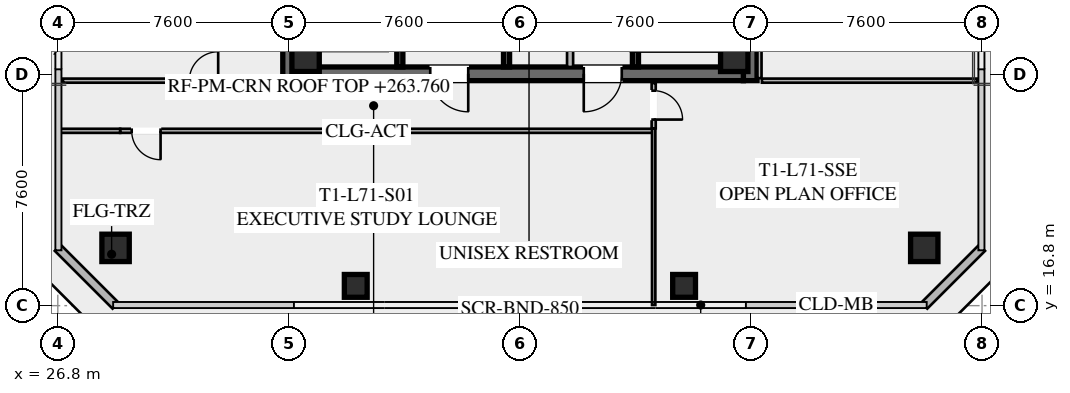
"""IFC4 building model, lengths in metres.
Left out: names, types, materials, properties, quantities, classifications, styles, units other than length and angle.
Written with IfcOpenShell. Run it as: python <this file> out.ifc"""

import sys

from ifc_helpers import new_model, si_unit, direction, frame, frame_2d, origin, origin_2d, place, context, subcontext, project, spatial, rectangle, hollow_rectangle, extrude, element, fill, save


model = new_model("IFC4")
c1 = context("Model", 3, precision=1e-05, world=origin(), true_north=direction((0.0, 1.0)))
c2 = subcontext(c1, "Body", "Model", "MODEL_VIEW")
j1 = project(units=[si_unit("LENGTHUNIT", "METRE"), si_unit("PLANEANGLEUNIT", "RADIAN")], contexts=[c1])
p1 = place(None, origin())
s1 = spatial("IfcSite", under=j1, at=p1, CompositionType="ELEMENT")
p2 = place(p1, origin())
s2 = spatial("IfcBuilding", under=s1, at=p2, CompositionType="ELEMENT")
p3 = place(p2, frame((0.0, 0.0, 263.4)))
s3 = spatial("IfcBuildingStorey", under=s2, at=p3, CompositionType="ELEMENT", Elevation=263.4)
for number, where, z_axis, x_axis in (
    (1, (34.425, 24.2, 0.0), (0.0, 0.0, 1.0), (0.0, 1.0, 0.0)),
    (2, (49.575, 39.8, 0.0), (0.0, 0.0, 1.0), (0.0, -1.0, 0.0)),
):
    element("IfcWall", number, at=place(p3, frame(where, z_axis=z_axis, x_axis=x_axis)), inside=s3, PredefinedType="SHEAR", context=c2, shape_type="SweptSolid", body=[
        extrude(rectangle(XDim=15.6, YDim=0.45, at=frame_2d((7.8, 0.0))), origin(), (0.0, 0.0, 1.0), 3.55),
    ])
p4 = place(p3, frame((49.35, 24.425, 0.0), z_axis=(0.0, 0.0, 1.0), x_axis=(-1.0, 0.0, 0.0)))
e3 = element("IfcWall", 3, at=p4, inside=s3, PredefinedType="SHEAR", context=c2, shape_type="SweptSolid", body=[
    extrude(rectangle(XDim=14.7, YDim=0.45, at=frame_2d((7.35, 0.0))), origin(), (0.0, 0.0, 1.0), 3.55),
])
p5 = place(p4, frame((9.05, 0.0, 0.0)))
e4 = element("IfcOpeningElement", 4, at=p5, cuts=e3, PredefinedType="OPENING", context=c2, shape_type="SweptSolid", body=[
    extrude(rectangle(XDim=1.25, YDim=2.25, at=frame_2d((0.625, 1.125))), frame((0.0, 0.235, 0.0), z_axis=(0.0, -1.0, 0.0), x_axis=(1.0, 0.0, 0.0)), (0.0, 0.0, 1.0), 0.47),
])
p6 = place(p4, frame((4.0, 0.0, 0.0)))
e5 = element("IfcOpeningElement", 5, at=p6, cuts=e3, PredefinedType="OPENING", context=c2, shape_type="SweptSolid", body=[
    extrude(rectangle(XDim=1.25, YDim=2.25, at=frame_2d((0.625, 1.125))), frame((0.0, 0.235, 0.0), z_axis=(0.0, -1.0, 0.0), x_axis=(1.0, 0.0, 0.0)), (0.0, 0.0, 1.0), 0.47),
])
for number, where, z_axis, x_axis in (
    (6, (34.95, 24.95, 0.0), (0.0, 0.0, 1.0), (1.0, 0.0, 0.0)),
    (7, (49.05, 24.95, 0.0), (0.0, 0.0, 1.0), (1.0, 0.0, 0.0)),
):
    element("IfcColumn", number, at=place(p3, frame(where, z_axis=z_axis, x_axis=x_axis)), inside=s3, PredefinedType="COLUMN", context=c2, shape_type="SweptSolid", body=[
        extrude(hollow_rectangle(XDim=0.9, YDim=0.9, WallThickness=0.04, at=origin_2d()), origin(), (0.0, 0.0, 1.0), 3.37),
    ])
for number, where, z_axis, x_axis in (
    (8, (28.7, 18.7, -0.295), (0.0, 0.0, 1.0), (1.0, 0.0, 0.0)),
    (9, (55.3, 18.7, -0.295), (0.0, 0.0, 1.0), (1.0, 0.0, 0.0)),
):
    element("IfcColumn", number, at=place(p3, frame(where, z_axis=z_axis, x_axis=x_axis)), inside=s3, PredefinedType="COLUMN", context=c2, shape_type="SweptSolid", body=[
        extrude(hollow_rectangle(XDim=0.9, YDim=0.9, WallThickness=0.04, at=origin_2d()), origin(), (0.0, 0.0, 1.0), 3.665),
    ])
for number, where, z_axis, x_axis in (
    (10, (36.6, 17.45, -0.295), (0.0, 0.0, 1.0), (1.0, 0.0, 0.0)),
    (11, (47.4, 17.45, -0.295), (0.0, 0.0, 1.0), (1.0, 0.0, 0.0)),
):
    element("IfcColumn", number, at=place(p3, frame(where, z_axis=z_axis, x_axis=x_axis)), inside=s3, PredefinedType="COLUMN", context=c2, shape_type="SweptSolid", body=[
        extrude(hollow_rectangle(XDim=0.75, YDim=0.75, WallThickness=0.032, at=origin_2d()), origin(), (0.0, 0.0, 1.0), 3.665),
    ])
for number, where, z_axis, x_axis in (
    (12, (28.7, 16.8, 0.0), (0.0, 0.0, 1.0), (-0.707, 0.707, 0.0)),
    (13, (57.2, 18.7, 0.0), (0.0, 0.0, 1.0), (-0.707, -0.707, 0.0)),
):
    element("IfcWall", number, at=place(p3, frame(where, z_axis=z_axis, x_axis=x_axis)), inside=s3, PredefinedType="SOLIDWALL", context=c2, shape_type="SweptSolid", body=[
        extrude(rectangle(XDim=2.687, YDim=0.28, at=frame_2d((1.343, 0.0))), origin(), (0.0, 0.0, 1.0), 3.37),
    ])
p7 = place(p3, frame((45.8, 32.8, 0.0), z_axis=(0.0, 0.0, 1.0), x_axis=(0.0, -1.0, 0.0)))
e14 = element("IfcWall", 14, at=p7, inside=s3, PredefinedType="SHEAR", context=c2, shape_type="SweptSolid", body=[
    extrude(rectangle(XDim=8.15, YDim=0.2, at=frame_2d((4.075, 0.0))), origin(), (0.0, 0.0, 1.0), 3.37),
])
p8 = place(p7, frame((0.45, 0.0, 0.0)))
e15 = element("IfcOpeningElement", 15, at=p8, cuts=e14, PredefinedType="OPENING", context=c2, shape_type="SweptSolid", body=[
    extrude(rectangle(XDim=1.15, YDim=2.2, at=frame_2d((0.575, 1.1))), frame((0.0, 0.11, 0.0), z_axis=(0.0, -1.0, 0.0), x_axis=(1.0, 0.0, 0.0)), (0.0, 0.0, 1.0), 0.22),
])
p9 = place(p3, frame((41.56, 24.65, 0.0), z_axis=(0.0, 0.0, 1.0), x_axis=(0.0, 1.0, 0.0)))
e16 = element("IfcWall", 16, at=p9, inside=s3, PredefinedType="SHEAR", context=c2, shape_type="SweptSolid", body=[
    extrude(rectangle(XDim=14.7, YDim=0.2, at=frame_2d((7.35, 0.0))), origin(), (0.0, 0.0, 1.0), 3.37),
])
p10 = place(p3, frame((38.05, 24.65, 0.0), z_axis=(0.0, 0.0, 1.0), x_axis=(0.0, 1.0, 0.0)))
e17 = element("IfcWall", 17, at=p10, inside=s3, PredefinedType="SHEAR", context=c2, shape_type="SweptSolid", body=[
    extrude(rectangle(XDim=6.55, YDim=0.2, at=frame_2d((3.275, 0.0))), origin(), (0.0, 0.0, 1.0), 3.37),
])
p11 = place(p10, frame((4.975, 0.0, 0.0)))
e18 = element("IfcOpeningElement", 18, at=p11, cuts=e17, PredefinedType="OPENING", context=c2, shape_type="SweptSolid", body=[
    extrude(rectangle(XDim=1.3, YDim=2.25, at=frame_2d((0.65, 1.125))), frame((0.0, 0.11, 0.0), z_axis=(0.0, -1.0, 0.0), x_axis=(1.0, 0.0, 0.0)), (0.0, 0.0, 1.0), 0.22),
])
p12 = place(p10, frame((2.975, 0.0, 0.0)))
e19 = element("IfcOpeningElement", 19, at=p12, cuts=e17, PredefinedType="OPENING", context=c2, shape_type="SweptSolid", body=[
    extrude(rectangle(XDim=1.3, YDim=2.25, at=frame_2d((0.65, 1.125))), frame((0.0, 0.11, 0.0), z_axis=(0.0, -1.0, 0.0), x_axis=(1.0, 0.0, 0.0)), (0.0, 0.0, 1.0), 0.22),
])
p13 = place(p10, frame((0.775, 0.0, 0.0)))
e20 = element("IfcOpeningElement", 20, at=p13, cuts=e17, PredefinedType="OPENING", context=c2, shape_type="SweptSolid", body=[
    extrude(rectangle(XDim=1.3, YDim=2.25, at=frame_2d((0.65, 1.125))), frame((0.0, 0.11, 0.0), z_axis=(0.0, -1.0, 0.0), x_axis=(1.0, 0.0, 0.0)), (0.0, 0.0, 1.0), 0.22),
])
p14 = place(p3, frame((43.65, 24.65, 0.0), z_axis=(0.0, 0.0, 1.0), x_axis=(0.0, 1.0, 0.0)))
e21 = element("IfcWall", 21, at=p14, inside=s3, PredefinedType="SOLIDWALL", context=c2, shape_type="SweptSolid", body=[
    extrude(rectangle(XDim=7.0, YDim=0.2, at=frame_2d((3.5, 0.0))), origin(), (0.0, 0.0, 1.0), 2.723),
])
p15 = place(p14, frame((0.85, 0.0, 0.0)))
e22 = element("IfcOpeningElement", 22, at=p15, cuts=e21, PredefinedType="OPENING", context=c2, shape_type="SweptSolid", body=[
    extrude(rectangle(XDim=0.95, YDim=2.05, at=frame_2d((0.475, 1.025))), frame((0.0, 0.11, 0.0), z_axis=(0.0, -1.0, 0.0), x_axis=(1.0, 0.0, 0.0)), (0.0, 0.0, 1.0), 0.22),
])
p16 = place(p14, frame((4.8, 0.0, 0.0)))
e23 = element("IfcOpeningElement", 23, at=p16, cuts=e21, PredefinedType="OPENING", context=c2, shape_type="SweptSolid", body=[
    extrude(rectangle(XDim=1.05, YDim=2.2, at=frame_2d((0.525, 1.1))), frame((0.0, 0.11, 0.0), z_axis=(0.0, -1.0, 0.0), x_axis=(1.0, 0.0, 0.0)), (0.0, 0.0, 1.0), 0.22),
])
p17 = place(p3, frame((46.4, 22.55, 0.0), z_axis=(0.0, 0.0, 1.0), x_axis=(-1.0, 0.0, 0.0)))
e24 = element("IfcWall", 24, at=p17, inside=s3, PredefinedType="PARTITIONING", context=c2, shape_type="SweptSolid", body=[
    extrude(rectangle(XDim=17.55, YDim=0.135, at=frame_2d((8.775, 0.0))), origin(), (0.0, 0.0, 1.0), 2.723),
])
p18 = place(p17, frame((16.22, 0.0, 0.0)))
e25 = element("IfcOpeningElement", 25, at=p18, cuts=e24, PredefinedType="OPENING", context=c2, shape_type="SweptSolid", body=[
    extrude(rectangle(XDim=0.95, YDim=2.05, at=frame_2d((0.475, 1.025))), frame((0.0, 0.077, 0.0), z_axis=(0.0, -1.0, 0.0), x_axis=(1.0, 0.0, 0.0)), (0.0, 0.0, 1.0), 0.155),
])
p19 = place(p3, frame((26.82, 22.55, 0.0), z_axis=(0.0, 0.0, 1.0), x_axis=(1.0, 0.0, 0.0)))
e26 = element("IfcWall", 26, at=p19, inside=s3, PredefinedType="PARTITIONING", context=c2, shape_type="SweptSolid", body=[
    extrude(rectangle(XDim=2.03, YDim=0.135, at=frame_2d((1.015, 0.0))), origin(), (0.0, 0.0, 1.0), 2.723),
])
p20 = place(p3, frame((46.4, 24.12, 0.0), z_axis=(0.0, 0.0, 1.0), x_axis=(0.0, -1.0, 0.0)))
e27 = element("IfcWall", 27, at=p20, inside=s3, PredefinedType="PARTITIONING", context=c2, shape_type="SweptSolid", body=[
    extrude(rectangle(XDim=1.49, YDim=0.135, at=frame_2d((0.745, 0.0))), origin(), (0.0, 0.0, 1.0), 2.723),
])
p21 = place(p20, frame((0.25, 0.0, 0.0)))
e28 = element("IfcOpeningElement", 28, at=p21, cuts=e27, PredefinedType="OPENING", context=c2, shape_type="SweptSolid", body=[
    extrude(rectangle(XDim=0.95, YDim=2.05, at=frame_2d((0.475, 1.025))), frame((0.0, 0.077, 0.0), z_axis=(0.0, -1.0, 0.0), x_axis=(1.0, 0.0, 0.0)), (0.0, 0.0, 1.0), 0.155),
])
p22 = place(p3, frame((46.4, 16.82, 0.0), z_axis=(0.0, 0.0, 1.0), x_axis=(0.0, 1.0, 0.0)))
e29 = element("IfcWall", 29, at=p22, inside=s3, PredefinedType="PARTITIONING", context=c2, shape_type="SweptSolid", body=[
    extrude(rectangle(XDim=5.81, YDim=0.11, at=frame_2d((2.905, 0.0))), origin(), (0.0, 0.0, 1.0), 2.723),
])
p23 = place(p3, frame((49.88, 39.72, 0.0), z_axis=(0.0, 0.0, 1.0), x_axis=(0.0, -1.0, 0.0)))
e30 = element("IfcWall", 30, at=p23, inside=s3, PredefinedType="PARTITIONING", context=c2, shape_type="SweptSolid", body=[
    extrude(rectangle(XDim=15.44, YDim=0.135, at=frame_2d((7.72, 0.0))), origin(), (0.0, 0.0, 1.0), 2.723),
])
p24 = place(p3, frame((49.96, 24.2, 0.0), z_axis=(0.0, 0.0, 1.0), x_axis=(1.0, 0.0, 0.0)))
e31 = element("IfcWall", 31, at=p24, inside=s3, PredefinedType="PARTITIONING", context=c2, shape_type="SweptSolid", body=[
    extrude(rectangle(XDim=7.07, YDim=0.135, at=frame_2d((3.535, 0.0))), origin(), (0.0, 0.0, 1.0), 2.723),
])
p25 = place(p3, frame((26.97, 24.2, 0.0), z_axis=(0.0, 0.0, 1.0), x_axis=(1.0, 0.0, 0.0)))
e32 = element("IfcWall", 32, at=p25, inside=s3, PredefinedType="PARTITIONING", context=c2, shape_type="SweptSolid", body=[
    extrude(rectangle(XDim=7.15, YDim=0.135, at=frame_2d((3.575, 0.0))), origin(), (0.0, 0.0, 1.0), 2.723),
])
p26 = place(p25, frame((4.155, 0.0, 0.0)))
e33 = element("IfcOpeningElement", 33, at=p26, cuts=e32, PredefinedType="OPENING", context=c2, shape_type="SweptSolid", body=[
    extrude(rectangle(XDim=0.95, YDim=2.05, at=frame_2d((0.475, 1.025))), frame((0.0, 0.077, 0.0), z_axis=(0.0, -1.0, 0.0), x_axis=(1.0, 0.0, 0.0)), (0.0, 0.0, 1.0), 0.155),
])
p27 = place(p5, origin())
e34 = element("IfcDoor", 34, at=p27, inside=s3, OperationType="SINGLE_SWING_LEFT", PredefinedType="DOOR", context=c2, shape_type="SweptSolid", body=[
    extrude(rectangle(XDim=1.25, YDim=2.25, at=frame_2d((0.625, 1.125))), frame((0.0, 0.025, 0.0), z_axis=(0.0, -1.0, 0.0), x_axis=(1.0, 0.0, 0.0)), (0.0, 0.0, 1.0), 0.05),
])
fill(e4, e34)
p28 = place(p6, origin())
e35 = element("IfcDoor", 35, at=p28, inside=s3, OperationType="SINGLE_SWING_RIGHT", PredefinedType="DOOR", context=c2, shape_type="SweptSolid", body=[
    extrude(rectangle(XDim=1.25, YDim=2.25, at=frame_2d((0.625, 1.125))), frame((0.0, 0.025, 0.0), z_axis=(0.0, -1.0, 0.0), x_axis=(1.0, 0.0, 0.0)), (0.0, 0.0, 1.0), 0.05),
])
fill(e5, e35)
p29 = place(p18, origin())
e36 = element("IfcDoor", 36, at=p29, inside=s3, OperationType="SINGLE_SWING_LEFT", PredefinedType="DOOR", context=c2, shape_type="SweptSolid", body=[
    extrude(rectangle(XDim=0.95, YDim=2.05, at=frame_2d((0.475, 1.025))), frame((0.0, 0.025, 0.0), z_axis=(0.0, -1.0, 0.0), x_axis=(1.0, 0.0, 0.0)), (0.0, 0.0, 1.0), 0.05),
])
fill(e25, e36)
p30 = place(p21, origin())
e37 = element("IfcDoor", 37, at=p30, inside=s3, OperationType="SINGLE_SWING_RIGHT", PredefinedType="DOOR", context=c2, shape_type="SweptSolid", body=[
    extrude(rectangle(XDim=0.95, YDim=2.05, at=frame_2d((0.475, 1.025))), frame((0.0, 0.025, 0.0), z_axis=(0.0, -1.0, 0.0), x_axis=(1.0, 0.0, 0.0)), (0.0, 0.0, 1.0), 0.05),
])
fill(e28, e37)
p31 = place(p26, origin())
e38 = element("IfcDoor", 38, at=p31, inside=s3, OperationType="SINGLE_SWING_RIGHT", PredefinedType="DOOR", context=c2, shape_type="SweptSolid", body=[
    extrude(rectangle(XDim=0.95, YDim=2.05, at=frame_2d((0.475, 1.025))), frame((0.0, 0.025, 0.0), z_axis=(0.0, -1.0, 0.0), x_axis=(1.0, 0.0, 0.0)), (0.0, 0.0, 1.0), 0.05),
])
fill(e33, e38)
save(model, sys.argv[1])
